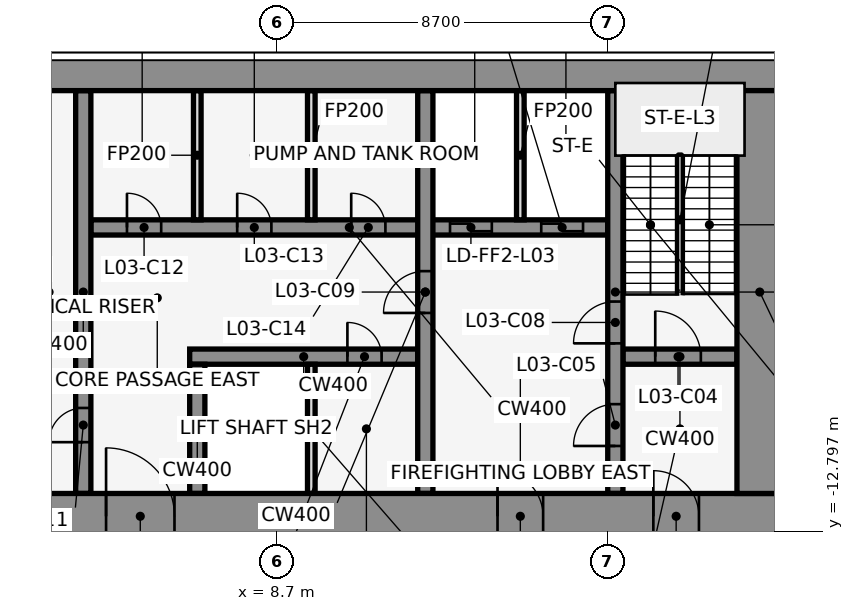
"""IFC4 building model, lengths in metres.
Left out: names, types, materials, properties, quantities, classifications, styles, units other than length and angle.
Written with IfcOpenShell. Run it as: python <this file> out.ifc"""

import sys

from ifc_helpers import new_model, si_unit, direction, frame, frame_2d, origin, place, context, subcontext, project, spatial, rectangle, extrude, element, fill, save


model = new_model("IFC4")
c1 = context("Model", 3, precision=1e-05, world=origin(), true_north=direction((0.0, 1.0)))
c2 = subcontext(c1, "Body", "Model", "MODEL_VIEW")
j1 = project(units=[si_unit("LENGTHUNIT", "METRE"), si_unit("PLANEANGLEUNIT", "RADIAN")], contexts=[c1])
p1 = place(None, origin())
s1 = spatial("IfcSite", under=j1, at=p1, CompositionType="ELEMENT")
p2 = place(p1, origin())
s2 = spatial("IfcBuilding", under=s1, at=p2, CompositionType="ELEMENT")
p3 = place(p2, frame((0.0, 0.0, 20.0)))
s3 = spatial("IfcBuildingStorey", under=s2, at=p3, CompositionType="ELEMENT", Elevation=20.0)
p4 = place(p3, frame((6.4, -8.2, 0.0), z_axis=(0.0, 0.0, 1.0), x_axis=(1.0, 0.0, 0.0)))
e1 = element("IfcWall", 1, at=p4, inside=s3, PredefinedType="SHEAR", context=c2, shape_type="SweptSolid", body=[
    extrude(rectangle(XDim=6.0, YDim=0.4, at=frame_2d((3.0, 0.0))), origin(), (0.0, 0.0, 1.0), 5.0),
])
p5 = place(p4, frame((4.15, 0.0, 0.0)))
e2 = element("IfcOpeningElement", 2, at=p5, cuts=e1, PredefinedType="OPENING", context=c2, shape_type="SweptSolid", body=[
    extrude(rectangle(XDim=0.9, YDim=2.1, at=frame_2d((0.45, 1.05))), frame((0.0, 0.212, 0.0), z_axis=(0.0, -1.0, 0.0), x_axis=(1.0, 0.0, 0.0)), (0.0, 0.0, 1.0), 0.424),
])
p6 = place(p3, frame((17.8, -8.2, 0.0), z_axis=(0.0, 0.0, 1.0), x_axis=(1.0, 0.0, 0.0)))
e3 = element("IfcWall", 3, at=p6, inside=s3, PredefinedType="SHEAR", context=c2, shape_type="SweptSolid", body=[
    extrude(rectangle(XDim=3.0, YDim=0.4, at=frame_2d((1.5, 0.0))), origin(), (0.0, 0.0, 1.0), 5.0),
])
p7 = place(p6, frame((0.85, 0.0, 0.0)))
e4 = element("IfcOpeningElement", 4, at=p7, cuts=e3, PredefinedType="OPENING", context=c2, shape_type="SweptSolid", body=[
    extrude(rectangle(XDim=1.2, YDim=2.1, at=frame_2d((0.6, 1.05))), frame((0.0, 0.212, 0.0), z_axis=(0.0, -1.0, 0.0), x_axis=(1.0, 0.0, 0.0)), (0.0, 0.0, 1.0), 0.424),
])
p8 = place(p3, frame((3.8, -4.8, 0.0), z_axis=(0.0, 0.0, 1.0), x_axis=(1.0, 0.0, 0.0)))
e5 = element("IfcWall", 5, at=p8, inside=s3, PredefinedType="SHEAR", context=c2, shape_type="SweptSolid", body=[
    extrude(rectangle(XDim=13.6, YDim=0.4, at=frame_2d((6.8, 0.0))), origin(), (0.0, 0.0, 1.0), 5.0),
])
p9 = place(p8, frame((9.45, 0.0, 0.0)))
e6 = element("IfcOpeningElement", 6, at=p9, cuts=e5, PredefinedType="OPENING", context=c2, shape_type="SweptSolid", body=[
    extrude(rectangle(XDim=1.1, YDim=2.1, at=frame_2d((0.55, 1.05))), frame((0.0, 0.212, 0.0), z_axis=(0.0, -1.0, 0.0), x_axis=(1.0, 0.0, 0.0)), (0.0, 0.0, 1.0), 0.424),
])
p10 = place(p8, frame((11.85, 0.0, 0.0)))
e7 = element("IfcOpeningElement", 7, at=p10, cuts=e5, PredefinedType="OPENING", context=c2, shape_type="SweptSolid", body=[
    extrude(rectangle(XDim=1.1, YDim=2.1, at=frame_2d((0.55, 1.05))), frame((0.0, 0.212, 0.0), z_axis=(0.0, -1.0, 0.0), x_axis=(1.0, 0.0, 0.0)), (0.0, 0.0, 1.0), 0.424),
])
p11 = place(p8, frame((0.95, 0.0, 0.0)))
e8 = element("IfcOpeningElement", 8, at=p11, cuts=e5, PredefinedType="OPENING", context=c2, shape_type="SweptSolid", body=[
    extrude(rectangle(XDim=0.9, YDim=2.1, at=frame_2d((0.45, 1.05))), frame((0.0, 0.212, 0.0), z_axis=(0.0, -1.0, 0.0), x_axis=(1.0, 0.0, 0.0)), (0.0, 0.0, 1.0), 0.424),
])
p12 = place(p8, frame((3.85, 0.0, 0.0)))
e9 = element("IfcOpeningElement", 9, at=p12, cuts=e5, PredefinedType="OPENING", context=c2, shape_type="SweptSolid", body=[
    extrude(rectangle(XDim=0.9, YDim=2.1, at=frame_2d((0.45, 1.05))), frame((0.0, 0.212, 0.0), z_axis=(0.0, -1.0, 0.0), x_axis=(1.0, 0.0, 0.0)), (0.0, 0.0, 1.0), 0.424),
])
p13 = place(p8, frame((6.85, 0.0, 0.0)))
e10 = element("IfcOpeningElement", 10, at=p13, cuts=e5, PredefinedType="OPENING", context=c2, shape_type="SweptSolid", body=[
    extrude(rectangle(XDim=0.9, YDim=2.1, at=frame_2d((0.45, 1.05))), frame((0.0, 0.212, 0.0), z_axis=(0.0, -1.0, 0.0), x_axis=(1.0, 0.0, 0.0)), (0.0, 0.0, 1.0), 0.424),
])
p14 = place(p3, frame((3.6, -11.8, 0.0), z_axis=(0.0, 0.0, 1.0), x_axis=(0.0, 1.0, 0.0)))
e11 = element("IfcWall", 11, at=p14, inside=s3, PredefinedType="SHEAR", context=c2, shape_type="SweptSolid", body=[
    extrude(rectangle(XDim=10.6, YDim=0.4, at=frame_2d((5.3, 0.0))), origin(), (0.0, 0.0, 1.0), 5.0),
])
p15 = place(p14, frame((1.35, 0.0, 0.0)))
e12 = element("IfcOpeningElement", 12, at=p15, cuts=e11, PredefinedType="OPENING", context=c2, shape_type="SweptSolid", body=[
    extrude(rectangle(XDim=0.9, YDim=2.1, at=frame_2d((0.45, 1.05))), frame((0.0, 0.212, 0.0), z_axis=(0.0, -1.0, 0.0), x_axis=(1.0, 0.0, 0.0)), (0.0, 0.0, 1.0), 0.424),
])
p16 = place(p3, frame((6.6, -11.8, 0.0), z_axis=(0.0, 0.0, 1.0), x_axis=(0.0, 1.0, 0.0)))
e13 = element("IfcWall", 13, at=p16, inside=s3, PredefinedType="SHEAR", context=c2, shape_type="SweptSolid", body=[
    extrude(rectangle(XDim=3.4, YDim=0.4, at=frame_2d((1.7, 0.0))), origin(), (0.0, 0.0, 1.0), 5.0),
])
for number, where, z_axis, x_axis in (
    (14, (6.6, -4.6, 0.0), (0.0, 0.0, 1.0), (0.0, 1.0, 0.0)),
    (15, (9.6, -11.8, 0.0), (0.0, 0.0, 1.0), (0.0, 1.0, 0.0)),
    (16, (9.6, -4.6, 0.0), (0.0, 0.0, 1.0), (0.0, 1.0, 0.0)),
):
    element("IfcWall", number, at=place(p3, frame(where, z_axis=z_axis, x_axis=x_axis)), inside=s3, PredefinedType="PARTITIONING", context=c2, shape_type="SweptSolid", body=[
        extrude(rectangle(XDim=3.4, YDim=0.2, at=frame_2d((1.7, 0.0))), origin(), (0.0, 0.0, 1.0), 4.7),
    ])
p17 = place(p3, frame((12.6, -11.8, 0.0), z_axis=(0.0, 0.0, 1.0), x_axis=(0.0, 1.0, 0.0)))
e17 = element("IfcWall", 17, at=p17, inside=s3, PredefinedType="SHEAR", context=c2, shape_type="SweptSolid", body=[
    extrude(rectangle(XDim=10.6, YDim=0.4, at=frame_2d((5.3, 0.0))), origin(), (0.0, 0.0, 1.0), 5.0),
])
p18 = place(p17, frame((4.75, 0.0, 0.0)))
e18 = element("IfcOpeningElement", 18, at=p18, cuts=e17, PredefinedType="OPENING", context=c2, shape_type="SweptSolid", body=[
    extrude(rectangle(XDim=1.1, YDim=2.1, at=frame_2d((0.55, 1.05))), frame((0.0, 0.212, 0.0), z_axis=(0.0, -1.0, 0.0), x_axis=(1.0, 0.0, 0.0)), (0.0, 0.0, 1.0), 0.424),
])
p19 = place(p3, frame((15.1, -4.6, 0.0), z_axis=(0.0, 0.0, 1.0), x_axis=(0.0, 1.0, 0.0)))
e19 = element("IfcWall", 19, at=p19, inside=s3, PredefinedType="PARTITIONING", context=c2, shape_type="SweptSolid", body=[
    extrude(rectangle(XDim=3.4, YDim=0.2, at=frame_2d((1.7, 0.0))), origin(), (0.0, 0.0, 1.0), 4.7),
])
p20 = place(p3, frame((17.6, -11.8, 0.0), z_axis=(0.0, 0.0, 1.0), x_axis=(0.0, 1.0, 0.0)))
e20 = element("IfcWall", 20, at=p20, inside=s3, PredefinedType="SHEAR", context=c2, shape_type="SweptSolid", body=[
    extrude(rectangle(XDim=10.6, YDim=0.4, at=frame_2d((5.3, 0.0))), origin(), (0.0, 0.0, 1.0), 5.0),
])
p21 = place(p20, frame((1.25, 0.0, 0.0)))
e21 = element("IfcOpeningElement", 21, at=p21, cuts=e20, PredefinedType="OPENING", context=c2, shape_type="SweptSolid", body=[
    extrude(rectangle(XDim=1.1, YDim=2.1, at=frame_2d((0.55, 1.05))), frame((0.0, 0.212, 0.0), z_axis=(0.0, -1.0, 0.0), x_axis=(1.0, 0.0, 0.0)), (0.0, 0.0, 1.0), 0.424),
])
p22 = place(p20, frame((3.95, 0.0, 0.0)))
e22 = element("IfcOpeningElement", 22, at=p22, cuts=e20, PredefinedType="OPENING", context=c2, shape_type="SweptSolid", body=[
    extrude(rectangle(XDim=1.1, YDim=2.1, at=frame_2d((0.55, 1.05))), frame((0.0, 0.212, 0.0), z_axis=(0.0, -1.0, 0.0), x_axis=(1.0, 0.0, 0.0)), (0.0, 0.0, 1.0), 0.424),
])
p23 = place(p3, frame((-22.0, -0.6, 0.0), z_axis=(0.0, 0.0, 1.0), x_axis=(1.0, 0.0, 0.0)))
e23 = element("IfcWall", 23, at=p23, inside=s3, PredefinedType="SHEAR", context=c2, shape_type="SweptSolid", body=[
    extrude(rectangle(XDim=44.0, YDim=1.2, at=frame_2d((22.0, 0.0))), origin(), (0.0, 0.0, 1.0), 5.0),
])
p24 = place(p3, frame((-22.0, -12.4, 0.0), z_axis=(0.0, 0.0, 1.0), x_axis=(1.0, 0.0, 0.0)))
e24 = element("IfcWall", 24, at=p24, inside=s3, PredefinedType="SHEAR", context=c2, shape_type="SweptSolid", body=[
    extrude(rectangle(XDim=44.0, YDim=1.2, at=frame_2d((22.0, 0.0))), origin(), (0.0, 0.0, 1.0), 5.0),
])
p25 = place(p24, frame((2.2, 0.0, 0.0)))
e25 = element("IfcOpeningElement", 25, at=p25, cuts=e24, PredefinedType="OPENING", context=c2, shape_type="SweptSolid", body=[
    extrude(rectangle(XDim=1.2, YDim=2.1, at=frame_2d((0.6, 1.05))), frame((0.0, 0.612, 0.0), z_axis=(0.0, -1.0, 0.0), x_axis=(1.0, 0.0, 0.0)), (0.0, 0.0, 1.0), 1.224),
])
p26 = place(p24, frame((21.4, 0.0, 0.0)))
e26 = element("IfcOpeningElement", 26, at=p26, cuts=e24, PredefinedType="OPENING", context=c2, shape_type="SweptSolid", body=[
    extrude(rectangle(XDim=1.2, YDim=2.1, at=frame_2d((0.6, 1.05))), frame((0.0, 0.612, 0.0), z_axis=(0.0, -1.0, 0.0), x_axis=(1.0, 0.0, 0.0)), (0.0, 0.0, 1.0), 1.224),
])
p27 = place(p24, frame((40.6, 0.0, 0.0)))
e27 = element("IfcOpeningElement", 27, at=p27, cuts=e24, PredefinedType="OPENING", context=c2, shape_type="SweptSolid", body=[
    extrude(rectangle(XDim=1.2, YDim=2.1, at=frame_2d((0.6, 1.05))), frame((0.0, 0.612, 0.0), z_axis=(0.0, -1.0, 0.0), x_axis=(1.0, 0.0, 0.0)), (0.0, 0.0, 1.0), 1.224),
])
p28 = place(p24, frame((16.0, 0.0, 0.0)))
e28 = element("IfcOpeningElement", 28, at=p28, cuts=e24, PredefinedType="OPENING", context=c2, shape_type="SweptSolid", body=[
    extrude(rectangle(XDim=1.8, YDim=2.1, at=frame_2d((0.9, 1.05))), frame((0.0, 0.612, 0.0), z_axis=(0.0, -1.0, 0.0), x_axis=(1.0, 0.0, 0.0)), (0.0, 0.0, 1.0), 1.224),
])
p29 = place(p24, frame((6.3, 0.0, 0.0)))
e29 = element("IfcOpeningElement", 29, at=p29, cuts=e24, PredefinedType="OPENING", context=c2, shape_type="SweptSolid", body=[
    extrude(rectangle(XDim=1.2, YDim=2.1, at=frame_2d((0.6, 1.05))), frame((0.0, 0.612, 0.0), z_axis=(0.0, -1.0, 0.0), x_axis=(1.0, 0.0, 0.0)), (0.0, 0.0, 1.0), 1.224),
])
p30 = place(p24, frame((26.2, 0.0, 0.0)))
e30 = element("IfcOpeningElement", 30, at=p30, cuts=e24, PredefinedType="OPENING", context=c2, shape_type="SweptSolid", body=[
    extrude(rectangle(XDim=1.8, YDim=2.1, at=frame_2d((0.9, 1.05))), frame((0.0, 0.612, 0.0), z_axis=(0.0, -1.0, 0.0), x_axis=(1.0, 0.0, 0.0)), (0.0, 0.0, 1.0), 1.224),
])
p31 = place(p24, frame((36.5, 0.0, 0.0)))
e31 = element("IfcOpeningElement", 31, at=p31, cuts=e24, PredefinedType="OPENING", context=c2, shape_type="SweptSolid", body=[
    extrude(rectangle(XDim=1.2, YDim=2.1, at=frame_2d((0.6, 1.05))), frame((0.0, 0.612, 0.0), z_axis=(0.0, -1.0, 0.0), x_axis=(1.0, 0.0, 0.0)), (0.0, 0.0, 1.0), 1.224),
])
p32 = place(p3, frame((21.4, -11.8, 0.0), z_axis=(0.0, 0.0, 1.0), x_axis=(0.0, 1.0, 0.0)))
e32 = element("IfcWall", 32, at=p32, inside=s3, PredefinedType="SHEAR", context=c2, shape_type="SweptSolid", body=[
    extrude(rectangle(XDim=10.6, YDim=1.2, at=frame_2d((5.3, 0.0))), origin(), (0.0, 0.0, 1.0), 5.0),
])
p33 = place(p7, origin())
e33 = element("IfcDoor", 33, at=p33, inside=s3, OperationType="SINGLE_SWING_RIGHT", PredefinedType="DOOR", context=c2, shape_type="SweptSolid", body=[
    extrude(rectangle(XDim=1.2, YDim=2.1, at=frame_2d((0.6, 1.05))), frame((0.0, 0.025, 0.0), z_axis=(0.0, -1.0, 0.0), x_axis=(1.0, 0.0, 0.0)), (0.0, 0.0, 1.0), 0.05),
])
fill(e4, e33)
p34 = place(p21, origin())
e34 = element("IfcDoor", 34, at=p34, inside=s3, OperationType="SINGLE_SWING_LEFT", PredefinedType="DOOR", context=c2, shape_type="SweptSolid", body=[
    extrude(rectangle(XDim=1.1, YDim=2.1, at=frame_2d((0.55, 1.05))), frame((0.0, 0.025, 0.0), z_axis=(0.0, -1.0, 0.0), x_axis=(1.0, 0.0, 0.0)), (0.0, 0.0, 1.0), 0.05),
])
fill(e21, e34)
p35 = place(p9, origin())
e35 = element("IfcDoor", 35, at=p35, inside=s3, OperationType="DOUBLE_DOOR_SLIDING", PredefinedType="DOOR", context=c2, shape_type="SweptSolid", body=[
    extrude(rectangle(XDim=1.1, YDim=2.1, at=frame_2d((0.55, 1.05))), frame((0.0, 0.025, 0.0), z_axis=(0.0, -1.0, 0.0), x_axis=(1.0, 0.0, 0.0)), (0.0, 0.0, 1.0), 0.05),
])
fill(e6, e35)
p36 = place(p10, origin())
e36 = element("IfcDoor", 36, at=p36, inside=s3, OperationType="DOUBLE_DOOR_SLIDING", PredefinedType="DOOR", context=c2, shape_type="SweptSolid", body=[
    extrude(rectangle(XDim=1.1, YDim=2.1, at=frame_2d((0.55, 1.05))), frame((0.0, 0.025, 0.0), z_axis=(0.0, -1.0, 0.0), x_axis=(1.0, 0.0, 0.0)), (0.0, 0.0, 1.0), 0.05),
])
fill(e7, e36)
p37 = place(p22, origin())
e37 = element("IfcDoor", 37, at=p37, inside=s3, OperationType="SINGLE_SWING_RIGHT", PredefinedType="DOOR", context=c2, shape_type="SweptSolid", body=[
    extrude(rectangle(XDim=1.1, YDim=2.1, at=frame_2d((0.55, 1.05))), frame((0.0, 0.025, 0.0), z_axis=(0.0, -1.0, 0.0), x_axis=(1.0, 0.0, 0.0)), (0.0, 0.0, 1.0), 0.05),
])
fill(e22, e37)
p38 = place(p18, frame((1.1, 0.0, 0.0), z_axis=(0.0, 0.0, 1.0), x_axis=(-1.0, 0.0, 0.0)))
e38 = element("IfcDoor", 38, at=p38, inside=s3, OperationType="SINGLE_SWING_RIGHT", PredefinedType="DOOR", context=c2, shape_type="SweptSolid", body=[
    extrude(rectangle(XDim=1.1, YDim=2.1, at=frame_2d((0.55, 1.05))), frame((0.0, 0.025, 0.0), z_axis=(0.0, -1.0, 0.0), x_axis=(1.0, 0.0, 0.0)), (0.0, 0.0, 1.0), 0.05),
])
fill(e18, e38)
p39 = place(p15, origin())
e39 = element("IfcDoor", 39, at=p39, inside=s3, OperationType="SINGLE_SWING_LEFT", PredefinedType="DOOR", context=c2, shape_type="SweptSolid", body=[
    extrude(rectangle(XDim=0.9, YDim=2.1, at=frame_2d((0.45, 1.05))), frame((0.0, 0.025, 0.0), z_axis=(0.0, -1.0, 0.0), x_axis=(1.0, 0.0, 0.0)), (0.0, 0.0, 1.0), 0.05),
])
fill(e12, e39)
p40 = place(p11, origin())
e40 = element("IfcDoor", 40, at=p40, inside=s3, OperationType="SINGLE_SWING_RIGHT", PredefinedType="DOOR", context=c2, shape_type="SweptSolid", body=[
    extrude(rectangle(XDim=0.9, YDim=2.1, at=frame_2d((0.45, 1.05))), frame((0.0, 0.025, 0.0), z_axis=(0.0, -1.0, 0.0), x_axis=(1.0, 0.0, 0.0)), (0.0, 0.0, 1.0), 0.05),
])
fill(e8, e40)
p41 = place(p12, origin())
e41 = element("IfcDoor", 41, at=p41, inside=s3, OperationType="SINGLE_SWING_LEFT", PredefinedType="DOOR", context=c2, shape_type="SweptSolid", body=[
    extrude(rectangle(XDim=0.9, YDim=2.1, at=frame_2d((0.45, 1.05))), frame((0.0, 0.025, 0.0), z_axis=(0.0, -1.0, 0.0), x_axis=(1.0, 0.0, 0.0)), (0.0, 0.0, 1.0), 0.05),
])
fill(e9, e41)
p42 = place(p13, origin())
e42 = element("IfcDoor", 42, at=p42, inside=s3, OperationType="SINGLE_SWING_RIGHT", PredefinedType="DOOR", context=c2, shape_type="SweptSolid", body=[
    extrude(rectangle(XDim=0.9, YDim=2.1, at=frame_2d((0.45, 1.05))), frame((0.0, 0.025, 0.0), z_axis=(0.0, -1.0, 0.0), x_axis=(1.0, 0.0, 0.0)), (0.0, 0.0, 1.0), 0.05),
])
fill(e10, e42)
p43 = place(p5, frame((0.9, 0.0, 0.0), z_axis=(0.0, 0.0, 1.0), x_axis=(-1.0, 0.0, 0.0)))
e43 = element("IfcDoor", 43, at=p43, inside=s3, OperationType="SINGLE_SWING_LEFT", PredefinedType="DOOR", context=c2, shape_type="SweptSolid", body=[
    extrude(rectangle(XDim=0.9, YDim=2.1, at=frame_2d((0.45, 1.05))), frame((0.0, 0.025, 0.0), z_axis=(0.0, -1.0, 0.0), x_axis=(1.0, 0.0, 0.0)), (0.0, 0.0, 1.0), 0.05),
])
fill(e2, e43)
p44 = place(p27, frame((1.2, 0.0, 0.0), z_axis=(0.0, 0.0, 1.0), x_axis=(-1.0, 0.0, 0.0)))
e44 = element("IfcDoor", 44, at=p44, inside=s3, OperationType="SINGLE_SWING_RIGHT", PredefinedType="DOOR", context=c2, shape_type="SweptSolid", body=[
    extrude(rectangle(XDim=1.2, YDim=2.1, at=frame_2d((0.6, 1.05))), frame((0.0, 0.025, 0.0), z_axis=(0.0, -1.0, 0.0), x_axis=(1.0, 0.0, 0.0)), (0.0, 0.0, 1.0), 0.05),
])
fill(e27, e44)
p45 = place(p30, origin())
e45 = element("IfcDoor", 45, at=p45, inside=s3, OperationType="SINGLE_SWING_LEFT", PredefinedType="DOOR", context=c2, shape_type="SweptSolid", body=[
    extrude(rectangle(XDim=1.8, YDim=2.1, at=frame_2d((0.9, 1.05))), frame((0.0, 0.025, 0.0), z_axis=(0.0, -1.0, 0.0), x_axis=(1.0, 0.0, 0.0)), (0.0, 0.0, 1.0), 0.05),
])
fill(e30, e45)
p46 = place(p31, frame((1.2, 0.0, 0.0), z_axis=(0.0, 0.0, 1.0), x_axis=(-1.0, 0.0, 0.0)))
e46 = element("IfcDoor", 46, at=p46, inside=s3, OperationType="SINGLE_SWING_RIGHT", PredefinedType="DOOR", context=c2, shape_type="SweptSolid", body=[
    extrude(rectangle(XDim=1.2, YDim=2.1, at=frame_2d((0.6, 1.05))), frame((0.0, 0.025, 0.0), z_axis=(0.0, -1.0, 0.0), x_axis=(1.0, 0.0, 0.0)), (0.0, 0.0, 1.0), 0.05),
])
fill(e31, e46)
save(model, sys.argv[1])
